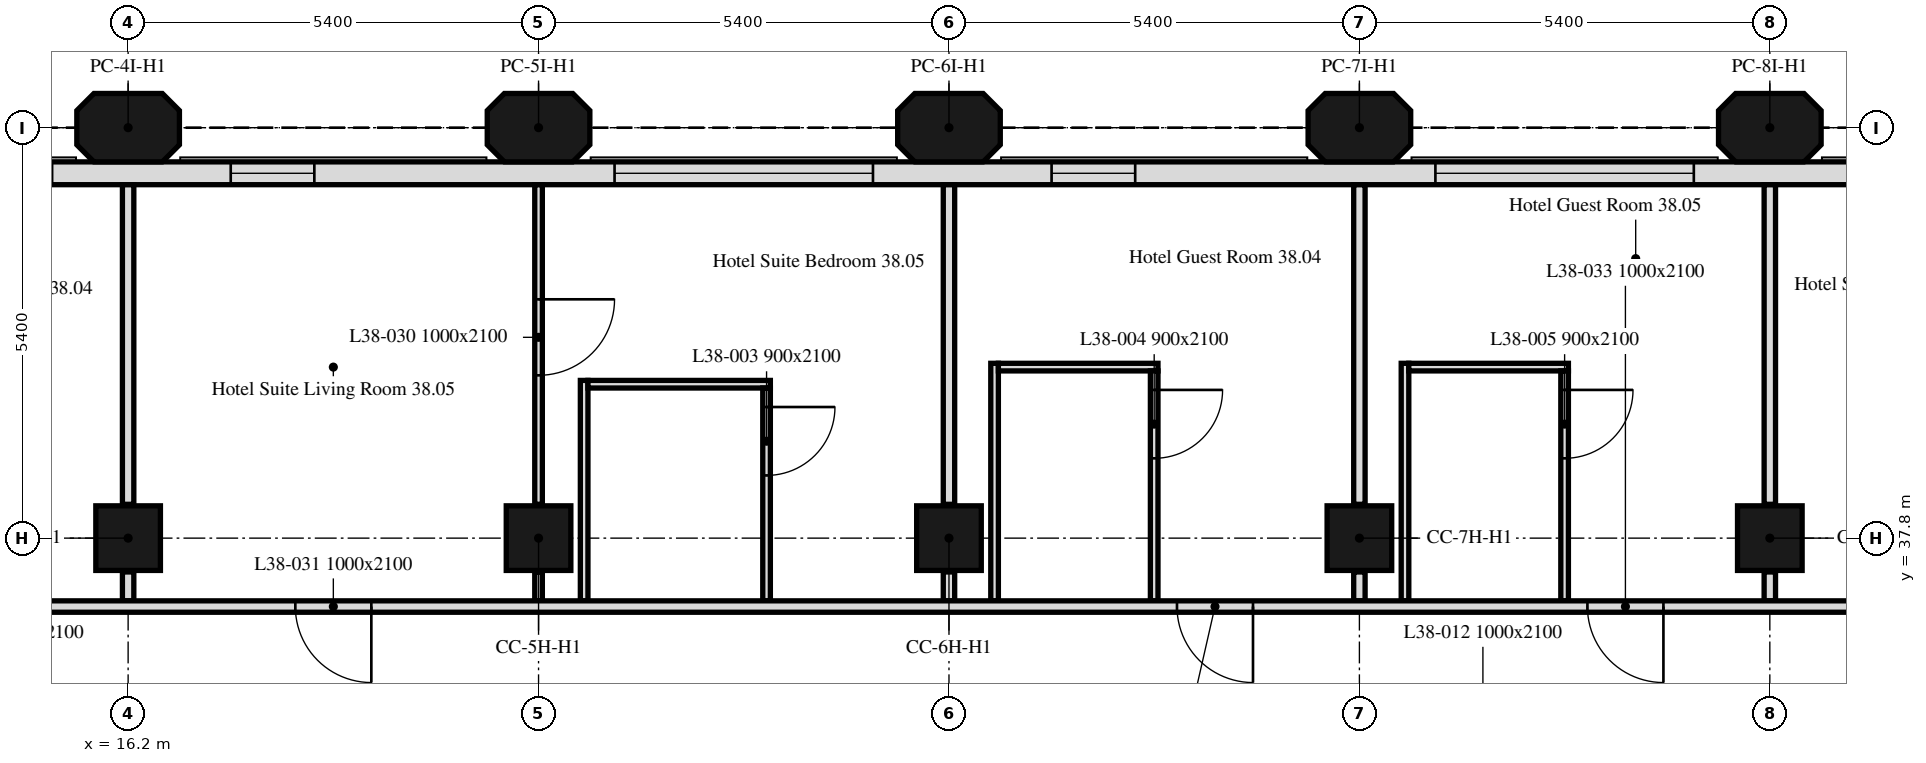
"""IFC4 building model, lengths in metres.
Left out: names, types, materials, properties, quantities, classifications, styles, units other than length and angle.
Written with IfcOpenShell. Run it as: python <this file> out.ifc"""

import sys

from ifc_helpers import new_model, si_unit, direction, frame, frame_2d, origin, origin_2d, place, context, subcontext, project, spatial, polyline, rectangle, outline, extrude, element, fill, save


model = new_model("IFC4")
c1 = context("Model", 3, precision=1e-05, world=origin(), true_north=direction((0.0, 1.0)))
c2 = subcontext(c1, "Body", "Model", "MODEL_VIEW")
j1 = project(units=[si_unit("LENGTHUNIT", "METRE"), si_unit("PLANEANGLEUNIT", "RADIAN")], contexts=[c1])
p1 = place(None, origin())
s1 = spatial("IfcSite", under=j1, at=p1, CompositionType="ELEMENT")
p2 = place(p1, origin())
s2 = spatial("IfcBuilding", under=s1, at=p2, CompositionType="ELEMENT")
p3 = place(p2, frame((0.0, 0.0, 162.7)))
s3 = spatial("IfcBuildingStorey", under=s2, at=p3, CompositionType="ELEMENT", Elevation=162.7)
for number, where, z_axis, x_axis in (
    (1, (16.2, 37.8, 0.0), (0.0, 0.0, 1.0), (1.0, 0.0, 0.0)),
    (2, (21.6, 37.8, 0.0), (0.0, 0.0, 1.0), (1.0, 0.0, 0.0)),
    (3, (27.0, 37.8, 0.0), (0.0, 0.0, 1.0), (1.0, 0.0, 0.0)),
    (4, (32.4, 37.8, 0.0), (0.0, 0.0, 1.0), (1.0, 0.0, 0.0)),
    (5, (37.8, 37.8, 0.0), (0.0, 0.0, 1.0), (1.0, 0.0, 0.0)),
):
    element("IfcColumn", number, at=place(p3, frame(where, z_axis=z_axis, x_axis=x_axis)), inside=s3, PredefinedType="COLUMN", context=c2, shape_type="SweptSolid", body=[
        extrude(rectangle(XDim=0.85, YDim=0.85, at=origin_2d()), origin(), (0.0, 0.0, 1.0), 3.0),
    ])
for number, where, z_axis, x_axis in (
    (6, (16.2, 43.2, 0.0), (0.0, 0.0, 1.0), (1.0, 0.0, 0.0)),
    (7, (21.6, 43.2, 0.0), (0.0, 0.0, 1.0), (1.0, 0.0, 0.0)),
    (8, (27.0, 43.2, 0.0), (0.0, 0.0, 1.0), (1.0, 0.0, 0.0)),
    (9, (32.4, 43.2, 0.0), (0.0, 0.0, 1.0), (1.0, 0.0, 0.0)),
    (10, (37.8, 43.2, 0.0), (0.0, 0.0, 1.0), (1.0, 0.0, 0.0)),
):
    element("IfcColumn", number, at=place(p3, frame(where, z_axis=z_axis, x_axis=x_axis)), inside=s3, PredefinedType="COLUMN", context=c2, shape_type="SweptSolid", body=[
        extrude(outline(polyline([(-0.45, -0.45), (0.45, -0.45), (0.675, -0.225), (0.675, 0.225), (0.45, 0.45), (-0.45, 0.45), (-0.675, 0.225), (-0.675, -0.225), (-0.45, -0.45)])), origin(), (0.0, 0.0, 1.0), 3.0),
    ])
p4 = place(p3, frame((43.014, 42.6, 0.0), z_axis=(0.0, 0.0, 1.0), x_axis=(-1.0, 0.0, 0.0)))
e11 = element("IfcWall", 11, at=p4, inside=s3, PredefinedType="SOLIDWALL", context=c2, shape_type="SweptSolid", body=[
    extrude(rectangle(XDim=32.027, YDim=0.3, at=frame_2d((16.014, 0.0))), origin(), (0.0, 0.0, 1.0), 3.0),
])
p5 = place(p4, frame((2.764, 0.0, 0.9)))
e12 = element("IfcOpeningElement", 12, at=p5, cuts=e11, PredefinedType="OPENING", context=c2, shape_type="SweptSolid", body=[
    extrude(rectangle(XDim=1.1, YDim=1.7, at=frame_2d((0.55, 0.85))), frame((0.0, 0.16, 0.0), z_axis=(0.0, -1.0, 0.0), x_axis=(1.0, 0.0, 0.0)), (0.0, 0.0, 1.0), 0.32),
])
p6 = place(p4, frame((6.214, 0.0, 0.9)))
e13 = element("IfcOpeningElement", 13, at=p6, cuts=e11, PredefinedType="OPENING", context=c2, shape_type="SweptSolid", body=[
    extrude(rectangle(XDim=3.4, YDim=1.7, at=frame_2d((1.7, 0.85))), frame((0.0, 0.16, 0.0), z_axis=(0.0, -1.0, 0.0), x_axis=(1.0, 0.0, 0.0)), (0.0, 0.0, 1.0), 0.32),
])
p7 = place(p4, frame((13.564, 0.0, 0.9)))
e14 = element("IfcOpeningElement", 14, at=p7, cuts=e11, PredefinedType="OPENING", context=c2, shape_type="SweptSolid", body=[
    extrude(rectangle(XDim=1.1, YDim=1.7, at=frame_2d((0.55, 0.85))), frame((0.0, 0.16, 0.0), z_axis=(0.0, -1.0, 0.0), x_axis=(1.0, 0.0, 0.0)), (0.0, 0.0, 1.0), 0.32),
])
p8 = place(p4, frame((17.014, 0.0, 0.9)))
e15 = element("IfcOpeningElement", 15, at=p8, cuts=e11, PredefinedType="OPENING", context=c2, shape_type="SweptSolid", body=[
    extrude(rectangle(XDim=3.4, YDim=1.7, at=frame_2d((1.7, 0.85))), frame((0.0, 0.16, 0.0), z_axis=(0.0, -1.0, 0.0), x_axis=(1.0, 0.0, 0.0)), (0.0, 0.0, 1.0), 0.32),
])
p9 = place(p4, frame((24.364, 0.0, 0.9)))
e16 = element("IfcOpeningElement", 16, at=p9, cuts=e11, PredefinedType="OPENING", context=c2, shape_type="SweptSolid", body=[
    extrude(rectangle(XDim=1.1, YDim=1.7, at=frame_2d((0.55, 0.85))), frame((0.0, 0.16, 0.0), z_axis=(0.0, -1.0, 0.0), x_axis=(1.0, 0.0, 0.0)), (0.0, 0.0, 1.0), 0.32),
])
p10 = place(p4, frame((27.814, 0.0, 0.9)))
e17 = element("IfcOpeningElement", 17, at=p10, cuts=e11, PredefinedType="OPENING", context=c2, shape_type="SweptSolid", body=[
    extrude(rectangle(XDim=3.4, YDim=1.7, at=frame_2d((1.7, 0.85))), frame((0.0, 0.16, 0.0), z_axis=(0.0, -1.0, 0.0), x_axis=(1.0, 0.0, 0.0)), (0.0, 0.0, 1.0), 0.32),
])
p11 = place(p3, frame((16.2, 36.975, 0.0), z_axis=(0.0, 0.0, 1.0), x_axis=(0.0, 1.0, 0.0)))
e18 = element("IfcWall", 18, at=p11, inside=s3, PredefinedType="PARTITIONING", context=c2, shape_type="SweptSolid", body=[
    extrude(rectangle(XDim=0.38, YDim=0.15, at=frame_2d((0.19, 0.0))), origin(), (0.0, 0.0, 1.0), 3.0),
])
p12 = place(p3, frame((16.2, 38.245, 0.0), z_axis=(0.0, 0.0, 1.0), x_axis=(0.0, 1.0, 0.0)))
e19 = element("IfcWall", 19, at=p12, inside=s3, PredefinedType="PARTITIONING", context=c2, shape_type="SweptSolid", body=[
    extrude(rectangle(XDim=4.204, YDim=0.15, at=frame_2d((2.102, 0.0))), origin(), (0.0, 0.0, 1.0), 3.0),
])
p13 = place(p3, frame((21.6, 42.449, 0.0), z_axis=(0.0, 0.0, 1.0), x_axis=(0.0, -1.0, 0.0)))
e20 = element("IfcWall", 20, at=p13, inside=s3, PredefinedType="PARTITIONING", context=c2, shape_type="SweptSolid", body=[
    extrude(rectangle(XDim=4.204, YDim=0.1, at=frame_2d((2.102, 0.0))), origin(), (0.0, 0.0, 1.0), 3.0),
])
p14 = place(p13, frame((1.507, 0.0, 0.0)))
e21 = element("IfcOpeningElement", 21, at=p14, cuts=e20, PredefinedType="OPENING", context=c2, shape_type="SweptSolid", body=[
    extrude(rectangle(XDim=1.0, YDim=2.1, at=frame_2d((0.5, 1.05))), frame((0.0, 0.05, 0.0), z_axis=(0.0, -1.0, 0.0), x_axis=(1.0, 0.0, 0.0)), (0.0, 0.0, 1.0), 0.1),
])
p15 = place(p3, frame((21.6, 37.355, 0.0), z_axis=(0.0, 0.0, 1.0), x_axis=(0.0, -1.0, 0.0)))
e22 = element("IfcWall", 22, at=p15, inside=s3, PredefinedType="PARTITIONING", context=c2, shape_type="SweptSolid", body=[
    extrude(rectangle(XDim=0.38, YDim=0.1, at=frame_2d((0.19, 0.0))), origin(), (0.0, 0.0, 1.0), 3.0),
])
p16 = place(p3, frame((22.2, 36.975, 0.0), z_axis=(0.0, 0.0, 1.0), x_axis=(0.0, 1.0, 0.0)))
e23 = element("IfcWall", 23, at=p16, inside=s3, PredefinedType="PARTITIONING", context=c2, shape_type="SweptSolid", body=[
    extrude(rectangle(XDim=2.9, YDim=0.1, at=frame_2d((1.45, 0.0))), origin(), (0.0, 0.0, 1.0), 3.0),
])
p17 = place(p3, frame((22.25, 39.825, 0.0), z_axis=(0.0, 0.0, 1.0), x_axis=(1.0, 0.0, 0.0)))
e24 = element("IfcWall", 24, at=p17, inside=s3, PredefinedType="PARTITIONING", context=c2, shape_type="SweptSolid", body=[
    extrude(rectangle(XDim=2.4, YDim=0.1, at=frame_2d((1.2, 0.0))), origin(), (0.0, 0.0, 1.0), 3.0),
])
p18 = place(p3, frame((24.6, 39.775, 0.0), z_axis=(0.0, 0.0, 1.0), x_axis=(0.0, -1.0, 0.0)))
e25 = element("IfcWall", 25, at=p18, inside=s3, PredefinedType="PARTITIONING", context=c2, shape_type="SweptSolid", body=[
    extrude(rectangle(XDim=2.8, YDim=0.1, at=frame_2d((1.4, 0.0))), origin(), (0.0, 0.0, 1.0), 3.0),
])
p19 = place(p18, frame((0.25, 0.0, 0.0)))
e26 = element("IfcOpeningElement", 26, at=p19, cuts=e25, PredefinedType="OPENING", context=c2, shape_type="SweptSolid", body=[
    extrude(rectangle(XDim=0.9, YDim=2.1, at=frame_2d((0.45, 1.05))), frame((0.0, 0.05, 0.0), z_axis=(0.0, -1.0, 0.0), x_axis=(1.0, 0.0, 0.0)), (0.0, 0.0, 1.0), 0.1),
])
p20 = place(p3, frame((27.0, 36.975, 0.0), z_axis=(0.0, 0.0, 1.0), x_axis=(0.0, 1.0, 0.0)))
e27 = element("IfcWall", 27, at=p20, inside=s3, PredefinedType="PARTITIONING", context=c2, shape_type="SweptSolid", body=[
    extrude(rectangle(XDim=0.38, YDim=0.15, at=frame_2d((0.19, 0.0))), origin(), (0.0, 0.0, 1.0), 3.0),
])
p21 = place(p3, frame((27.0, 38.245, 0.0), z_axis=(0.0, 0.0, 1.0), x_axis=(0.0, 1.0, 0.0)))
e28 = element("IfcWall", 28, at=p21, inside=s3, PredefinedType="PARTITIONING", context=c2, shape_type="SweptSolid", body=[
    extrude(rectangle(XDim=4.204, YDim=0.15, at=frame_2d((2.102, 0.0))), origin(), (0.0, 0.0, 1.0), 3.0),
])
p22 = place(p3, frame((27.6, 36.975, 0.0), z_axis=(0.0, 0.0, 1.0), x_axis=(0.0, 1.0, 0.0)))
e29 = element("IfcWall", 29, at=p22, inside=s3, PredefinedType="PARTITIONING", context=c2, shape_type="SweptSolid", body=[
    extrude(rectangle(XDim=3.125, YDim=0.1, at=frame_2d((1.562, 0.0))), origin(), (0.0, 0.0, 1.0), 3.0),
])
p23 = place(p3, frame((27.65, 40.05, 0.0), z_axis=(0.0, 0.0, 1.0), x_axis=(1.0, 0.0, 0.0)))
e30 = element("IfcWall", 30, at=p23, inside=s3, PredefinedType="PARTITIONING", context=c2, shape_type="SweptSolid", body=[
    extrude(rectangle(XDim=2.1, YDim=0.1, at=frame_2d((1.05, 0.0))), origin(), (0.0, 0.0, 1.0), 3.0),
])
p24 = place(p3, frame((29.7, 40.0, 0.0), z_axis=(0.0, 0.0, 1.0), x_axis=(0.0, -1.0, 0.0)))
e31 = element("IfcWall", 31, at=p24, inside=s3, PredefinedType="PARTITIONING", context=c2, shape_type="SweptSolid", body=[
    extrude(rectangle(XDim=3.025, YDim=0.1, at=frame_2d((1.512, 0.0))), origin(), (0.0, 0.0, 1.0), 3.0),
])
p25 = place(p24, frame((0.25, 0.0, 0.0)))
e32 = element("IfcOpeningElement", 32, at=p25, cuts=e31, PredefinedType="OPENING", context=c2, shape_type="SweptSolid", body=[
    extrude(rectangle(XDim=0.9, YDim=2.1, at=frame_2d((0.45, 1.05))), frame((0.0, 0.05, 0.0), z_axis=(0.0, -1.0, 0.0), x_axis=(1.0, 0.0, 0.0)), (0.0, 0.0, 1.0), 0.1),
])
p26 = place(p3, frame((32.4, 36.975, 0.0), z_axis=(0.0, 0.0, 1.0), x_axis=(0.0, 1.0, 0.0)))
e33 = element("IfcWall", 33, at=p26, inside=s3, PredefinedType="PARTITIONING", context=c2, shape_type="SweptSolid", body=[
    extrude(rectangle(XDim=0.38, YDim=0.15, at=frame_2d((0.19, 0.0))), origin(), (0.0, 0.0, 1.0), 3.0),
])
p27 = place(p3, frame((32.4, 38.245, 0.0), z_axis=(0.0, 0.0, 1.0), x_axis=(0.0, 1.0, 0.0)))
e34 = element("IfcWall", 34, at=p27, inside=s3, PredefinedType="PARTITIONING", context=c2, shape_type="SweptSolid", body=[
    extrude(rectangle(XDim=4.204, YDim=0.15, at=frame_2d((2.102, 0.0))), origin(), (0.0, 0.0, 1.0), 3.0),
])
p28 = place(p3, frame((33.0, 36.975, 0.0), z_axis=(0.0, 0.0, 1.0), x_axis=(0.0, 1.0, 0.0)))
e35 = element("IfcWall", 35, at=p28, inside=s3, PredefinedType="PARTITIONING", context=c2, shape_type="SweptSolid", body=[
    extrude(rectangle(XDim=3.125, YDim=0.1, at=frame_2d((1.562, 0.0))), origin(), (0.0, 0.0, 1.0), 3.0),
])
p29 = place(p3, frame((33.05, 40.05, 0.0), z_axis=(0.0, 0.0, 1.0), x_axis=(1.0, 0.0, 0.0)))
e36 = element("IfcWall", 36, at=p29, inside=s3, PredefinedType="PARTITIONING", context=c2, shape_type="SweptSolid", body=[
    extrude(rectangle(XDim=2.1, YDim=0.1, at=frame_2d((1.05, 0.0))), origin(), (0.0, 0.0, 1.0), 3.0),
])
p30 = place(p3, frame((35.1, 40.0, 0.0), z_axis=(0.0, 0.0, 1.0), x_axis=(0.0, -1.0, 0.0)))
e37 = element("IfcWall", 37, at=p30, inside=s3, PredefinedType="PARTITIONING", context=c2, shape_type="SweptSolid", body=[
    extrude(rectangle(XDim=3.025, YDim=0.1, at=frame_2d((1.512, 0.0))), origin(), (0.0, 0.0, 1.0), 3.0),
])
p31 = place(p30, frame((0.25, 0.0, 0.0)))
e38 = element("IfcOpeningElement", 38, at=p31, cuts=e37, PredefinedType="OPENING", context=c2, shape_type="SweptSolid", body=[
    extrude(rectangle(XDim=0.9, YDim=2.1, at=frame_2d((0.45, 1.05))), frame((0.0, 0.05, 0.0), z_axis=(0.0, -1.0, 0.0), x_axis=(1.0, 0.0, 0.0)), (0.0, 0.0, 1.0), 0.1),
])
p32 = place(p3, frame((37.8, 36.975, 0.0), z_axis=(0.0, 0.0, 1.0), x_axis=(0.0, 1.0, 0.0)))
e39 = element("IfcWall", 39, at=p32, inside=s3, PredefinedType="PARTITIONING", context=c2, shape_type="SweptSolid", body=[
    extrude(rectangle(XDim=0.38, YDim=0.15, at=frame_2d((0.19, 0.0))), origin(), (0.0, 0.0, 1.0), 3.0),
])
p33 = place(p3, frame((37.8, 38.245, 0.0), z_axis=(0.0, 0.0, 1.0), x_axis=(0.0, 1.0, 0.0)))
e40 = element("IfcWall", 40, at=p33, inside=s3, PredefinedType="PARTITIONING", context=c2, shape_type="SweptSolid", body=[
    extrude(rectangle(XDim=4.204, YDim=0.15, at=frame_2d((2.102, 0.0))), origin(), (0.0, 0.0, 1.0), 3.0),
])
p34 = place(p3, frame((47.849, 36.9, 0.0), z_axis=(0.0, 0.0, 1.0), x_axis=(-1.0, 0.0, 0.0)))
e41 = element("IfcWall", 41, at=p34, inside=s3, PredefinedType="PARTITIONING", context=c2, shape_type="SweptSolid", body=[
    extrude(rectangle(XDim=41.698, YDim=0.15, at=frame_2d((20.849, 0.0))), origin(), (0.0, 0.0, 1.0), 3.0),
])
p35 = place(p34, frame((39.249, 0.0, 0.0)))
e42 = element("IfcOpeningElement", 42, at=p35, cuts=e41, PredefinedType="OPENING", context=c2, shape_type="SweptSolid", body=[
    extrude(rectangle(XDim=1.0, YDim=2.1, at=frame_2d((0.5, 1.05))), frame((0.0, 0.075, 0.0), z_axis=(0.0, -1.0, 0.0), x_axis=(1.0, 0.0, 0.0)), (0.0, 0.0, 1.0), 0.15),
])
p36 = place(p34, frame((28.449, 0.0, 0.0)))
e43 = element("IfcOpeningElement", 43, at=p36, cuts=e41, PredefinedType="OPENING", context=c2, shape_type="SweptSolid", body=[
    extrude(rectangle(XDim=1.0, YDim=2.1, at=frame_2d((0.5, 1.05))), frame((0.0, 0.075, 0.0), z_axis=(0.0, -1.0, 0.0), x_axis=(1.0, 0.0, 0.0)), (0.0, 0.0, 1.0), 0.15),
])
p37 = place(p34, frame((16.849, 0.0, 0.0)))
e44 = element("IfcOpeningElement", 44, at=p37, cuts=e41, PredefinedType="OPENING", context=c2, shape_type="SweptSolid", body=[
    extrude(rectangle(XDim=1.0, YDim=2.1, at=frame_2d((0.5, 1.05))), frame((0.0, 0.075, 0.0), z_axis=(0.0, -1.0, 0.0), x_axis=(1.0, 0.0, 0.0)), (0.0, 0.0, 1.0), 0.15),
])
p38 = place(p34, frame((11.449, 0.0, 0.0)))
e45 = element("IfcOpeningElement", 45, at=p38, cuts=e41, PredefinedType="OPENING", context=c2, shape_type="SweptSolid", body=[
    extrude(rectangle(XDim=1.0, YDim=2.1, at=frame_2d((0.5, 1.05))), frame((0.0, 0.075, 0.0), z_axis=(0.0, -1.0, 0.0), x_axis=(1.0, 0.0, 0.0)), (0.0, 0.0, 1.0), 0.15),
])
p39 = place(p34, frame((2.744, 0.0, 0.0)))
e46 = element("IfcOpeningElement", 46, at=p39, cuts=e41, PredefinedType="OPENING", context=c2, shape_type="SweptSolid", body=[
    extrude(rectangle(XDim=1.0, YDim=2.1, at=frame_2d((0.5, 1.05))), frame((0.0, 0.075, 0.0), z_axis=(0.0, -1.0, 0.0), x_axis=(1.0, 0.0, 0.0)), (0.0, 0.0, 1.0), 0.15),
])
p40 = place(p6, origin())
e47 = element("IfcWindow", 47, at=p40, inside=s3, PartitioningType="SINGLE_PANEL", PredefinedType="WINDOW", context=c2, shape_type="SweptSolid", body=[
    extrude(rectangle(XDim=3.4, YDim=1.7, at=frame_2d((1.7, 0.85))), frame((0.0, 0.03, 0.0), z_axis=(0.0, -1.0, 0.0), x_axis=(1.0, 0.0, 0.0)), (0.0, 0.0, 1.0), 0.06),
])
fill(e13, e47)
p41 = place(p7, origin())
e48 = element("IfcWindow", 48, at=p41, inside=s3, PartitioningType="SINGLE_PANEL", PredefinedType="WINDOW", context=c2, shape_type="SweptSolid", body=[
    extrude(rectangle(XDim=1.1, YDim=1.7, at=frame_2d((0.55, 0.85))), frame((0.0, 0.03, 0.0), z_axis=(0.0, -1.0, 0.0), x_axis=(1.0, 0.0, 0.0)), (0.0, 0.0, 1.0), 0.06),
])
fill(e14, e48)
p42 = place(p8, origin())
e49 = element("IfcWindow", 49, at=p42, inside=s3, PartitioningType="SINGLE_PANEL", PredefinedType="WINDOW", context=c2, shape_type="SweptSolid", body=[
    extrude(rectangle(XDim=3.4, YDim=1.7, at=frame_2d((1.7, 0.85))), frame((0.0, 0.03, 0.0), z_axis=(0.0, -1.0, 0.0), x_axis=(1.0, 0.0, 0.0)), (0.0, 0.0, 1.0), 0.06),
])
fill(e15, e49)
p43 = place(p9, origin())
e50 = element("IfcWindow", 50, at=p43, inside=s3, PartitioningType="SINGLE_PANEL", PredefinedType="WINDOW", context=c2, shape_type="SweptSolid", body=[
    extrude(rectangle(XDim=1.1, YDim=1.7, at=frame_2d((0.55, 0.85))), frame((0.0, 0.03, 0.0), z_axis=(0.0, -1.0, 0.0), x_axis=(1.0, 0.0, 0.0)), (0.0, 0.0, 1.0), 0.06),
])
fill(e16, e50)
p44 = place(p19, origin())
e51 = element("IfcDoor", 51, at=p44, inside=s3, OperationType="SINGLE_SWING_LEFT", PredefinedType="DOOR", context=c2, shape_type="SweptSolid", body=[
    extrude(rectangle(XDim=0.9, YDim=2.1, at=frame_2d((0.45, 1.05))), frame((0.0, 0.025, 0.0), z_axis=(0.0, -1.0, 0.0), x_axis=(1.0, 0.0, 0.0)), (0.0, 0.0, 1.0), 0.05),
])
fill(e26, e51)
p45 = place(p25, origin())
e52 = element("IfcDoor", 52, at=p45, inside=s3, OperationType="SINGLE_SWING_RIGHT", PredefinedType="DOOR", context=c2, shape_type="SweptSolid", body=[
    extrude(rectangle(XDim=0.9, YDim=2.1, at=frame_2d((0.45, 1.05))), frame((0.0, 0.025, 0.0), z_axis=(0.0, -1.0, 0.0), x_axis=(1.0, 0.0, 0.0)), (0.0, 0.0, 1.0), 0.05),
])
fill(e32, e52)
p46 = place(p31, origin())
e53 = element("IfcDoor", 53, at=p46, inside=s3, OperationType="SINGLE_SWING_RIGHT", PredefinedType="DOOR", context=c2, shape_type="SweptSolid", body=[
    extrude(rectangle(XDim=0.9, YDim=2.1, at=frame_2d((0.45, 1.05))), frame((0.0, 0.025, 0.0), z_axis=(0.0, -1.0, 0.0), x_axis=(1.0, 0.0, 0.0)), (0.0, 0.0, 1.0), 0.05),
])
fill(e38, e53)
p47 = place(p14, origin())
e54 = element("IfcDoor", 54, at=p47, inside=s3, OperationType="SINGLE_SWING_LEFT", PredefinedType="DOOR", context=c2, shape_type="SweptSolid", body=[
    extrude(rectangle(XDim=1.0, YDim=2.1, at=frame_2d((0.5, 1.05))), frame((0.0, 0.025, 0.0), z_axis=(0.0, -1.0, 0.0), x_axis=(1.0, 0.0, 0.0)), (0.0, 0.0, 1.0), 0.05),
])
fill(e21, e54)
p48 = place(p36, origin())
e55 = element("IfcDoor", 55, at=p48, inside=s3, OperationType="SINGLE_SWING_LEFT", PredefinedType="DOOR", context=c2, shape_type="SweptSolid", body=[
    extrude(rectangle(XDim=1.0, YDim=2.1, at=frame_2d((0.5, 1.05))), frame((0.0, 0.025, 0.0), z_axis=(0.0, -1.0, 0.0), x_axis=(1.0, 0.0, 0.0)), (0.0, 0.0, 1.0), 0.05),
])
fill(e43, e55)
p49 = place(p37, origin())
e56 = element("IfcDoor", 56, at=p49, inside=s3, OperationType="SINGLE_SWING_RIGHT", PredefinedType="DOOR", context=c2, shape_type="SweptSolid", body=[
    extrude(rectangle(XDim=1.0, YDim=2.1, at=frame_2d((0.5, 1.05))), frame((0.0, 0.025, 0.0), z_axis=(0.0, -1.0, 0.0), x_axis=(1.0, 0.0, 0.0)), (0.0, 0.0, 1.0), 0.05),
])
fill(e44, e56)
p50 = place(p38, origin())
e57 = element("IfcDoor", 57, at=p50, inside=s3, OperationType="SINGLE_SWING_LEFT", PredefinedType="DOOR", context=c2, shape_type="SweptSolid", body=[
    extrude(rectangle(XDim=1.0, YDim=2.1, at=frame_2d((0.5, 1.05))), frame((0.0, 0.025, 0.0), z_axis=(0.0, -1.0, 0.0), x_axis=(1.0, 0.0, 0.0)), (0.0, 0.0, 1.0), 0.05),
])
fill(e45, e57)
save(model, sys.argv[1])
